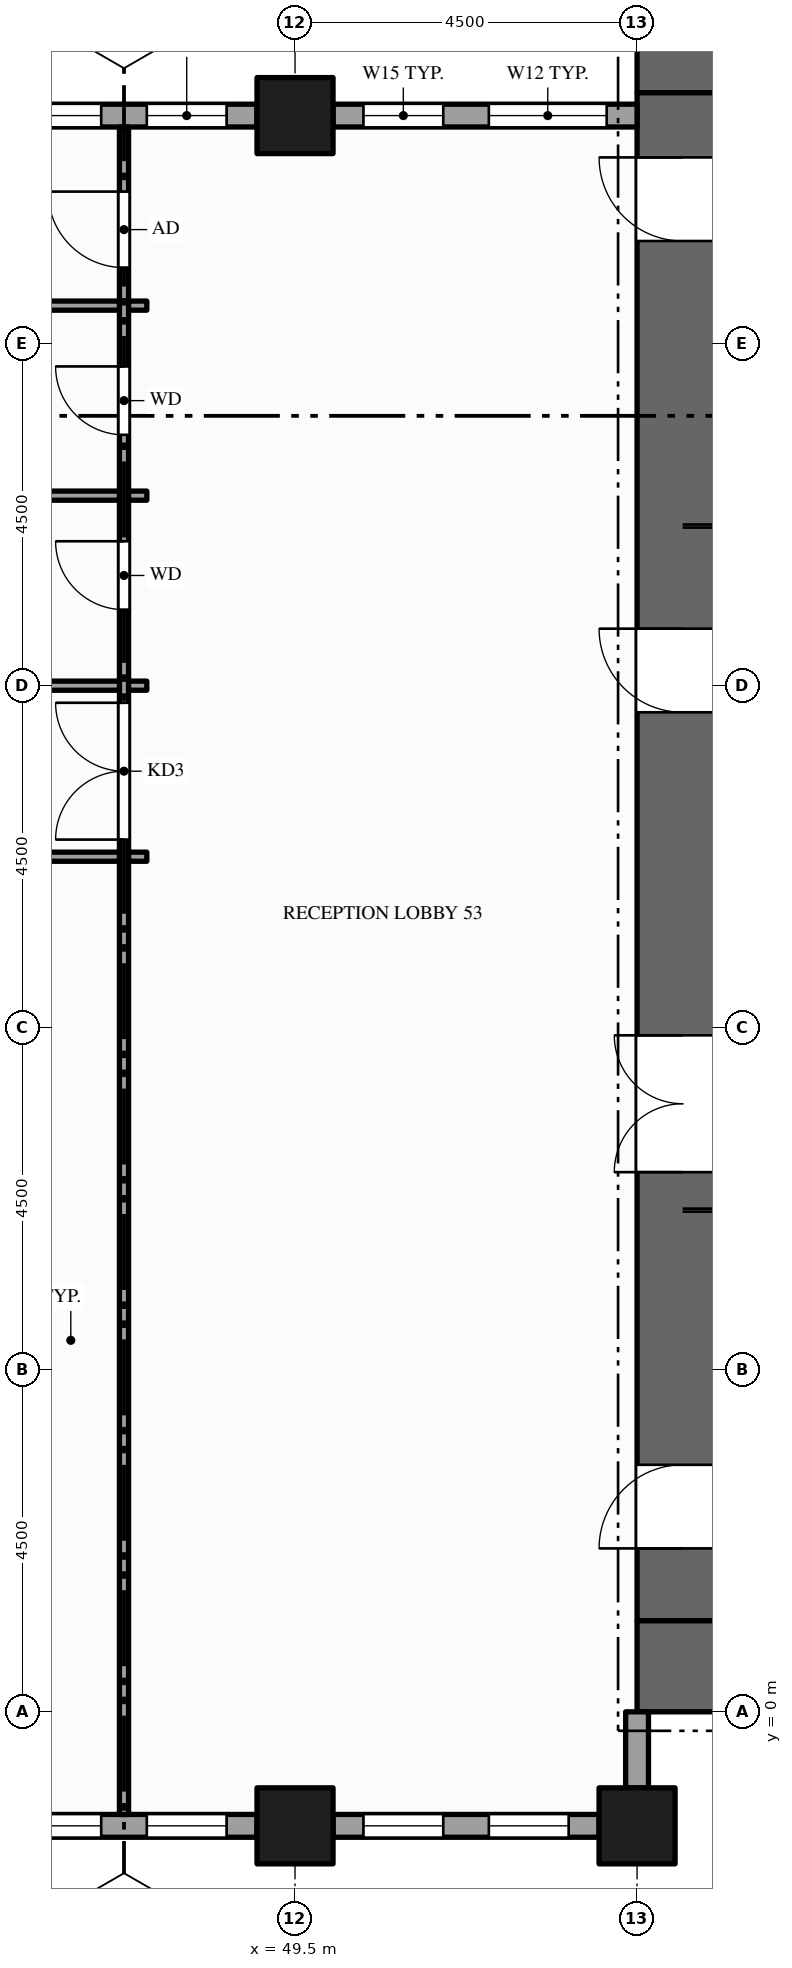
"""IFC4 building model, lengths in metres.
Left out: names, types, materials, properties, quantities, classifications, styles, units other than length and angle.
Written with IfcOpenShell. Run it as: python <this file> out.ifc"""

import sys

from ifc_helpers import new_model, si_unit, direction, frame, frame_2d, origin, origin_2d, place, context, subcontext, project, spatial, rectangle, hollow_rectangle, extrude, element, fill, save


model = new_model("IFC4")
c1 = context("Model", 3, precision=1e-05, world=origin(), true_north=direction((0.0, 1.0)))
c2 = subcontext(c1, "Body", "Model", "MODEL_VIEW")
j1 = project(units=[si_unit("LENGTHUNIT", "METRE"), si_unit("PLANEANGLEUNIT", "RADIAN")], contexts=[c1])
p1 = place(None, origin())
s1 = spatial("IfcSite", under=j1, at=p1, CompositionType="ELEMENT")
p2 = place(p1, origin())
s2 = spatial("IfcBuilding", under=s1, at=p2, CompositionType="ELEMENT")
p3 = place(p2, frame((0.0, 0.0, 127.0)))
s3 = spatial("IfcBuildingStorey", under=s2, at=p3, CompositionType="ELEMENT", Elevation=127.0)
for number, where, z_axis, x_axis in (
    (1, (67.5, 0.6, -0.15), (0.0, 0.0, 1.0), (-1.0, 0.0, 0.0)),
    (2, (54.0, 21.9, -0.15), (0.0, 0.0, 1.0), (1.0, 0.0, 0.0)),
):
    element("IfcWall", number, at=place(p3, frame(where, z_axis=z_axis, x_axis=x_axis)), inside=s3, PredefinedType="SHEAR", context=c2, shape_type="SweptSolid", body=[
        extrude(rectangle(XDim=13.5, YDim=1.2, at=frame_2d((6.75, 0.0))), origin(), (0.0, 0.0, 1.0), 4.0),
    ])
p4 = place(p3, frame((54.6, 1.2, -0.15), z_axis=(0.0, 0.0, 1.0), x_axis=(0.0, 1.0, 0.0)))
e3 = element("IfcWall", 3, at=p4, inside=s3, PredefinedType="SHEAR", context=c2, shape_type="SweptSolid", body=[
    extrude(rectangle(XDim=20.1, YDim=1.2, at=frame_2d((10.05, 0.0))), origin(), (0.0, 0.0, 1.0), 4.0),
])
p5 = place(p4, frame((5.9, 0.0, 0.15)))
e4 = element("IfcOpeningElement", 4, at=p5, cuts=e3, PredefinedType="OPENING", context=c2, shape_type="SweptSolid", body=[
    extrude(rectangle(XDim=1.8, YDim=2.1, at=frame_2d((0.9, 1.05))), frame((0.0, 0.61, 0.0), z_axis=(0.0, -1.0, 0.0), x_axis=(1.0, 0.0, 0.0)), (0.0, 0.0, 1.0), 1.22),
])
p6 = place(p4, frame((11.95, 0.0, 0.15)))
e5 = element("IfcOpeningElement", 5, at=p6, cuts=e3, PredefinedType="OPENING", context=c2, shape_type="SweptSolid", body=[
    extrude(rectangle(XDim=1.1, YDim=2.1, at=frame_2d((0.55, 1.05))), frame((0.0, 0.61, 0.0), z_axis=(0.0, -1.0, 0.0), x_axis=(1.0, 0.0, 0.0)), (0.0, 0.0, 1.0), 1.22),
])
p7 = place(p4, frame((0.95, 0.0, 0.15)))
e6 = element("IfcOpeningElement", 6, at=p7, cuts=e3, PredefinedType="OPENING", context=c2, shape_type="SweptSolid", body=[
    extrude(rectangle(XDim=1.1, YDim=2.1, at=frame_2d((0.55, 1.05))), frame((0.0, 0.61, 0.0), z_axis=(0.0, -1.0, 0.0), x_axis=(1.0, 0.0, 0.0)), (0.0, 0.0, 1.0), 1.22),
])
p8 = place(p4, frame((18.15, 0.0, 0.15)))
e7 = element("IfcOpeningElement", 7, at=p8, cuts=e3, PredefinedType="OPENING", context=c2, shape_type="SweptSolid", body=[
    extrude(rectangle(XDim=1.1, YDim=2.1, at=frame_2d((0.55, 1.05))), frame((0.0, 0.61, 0.0), z_axis=(0.0, -1.0, 0.0), x_axis=(1.0, 0.0, 0.0)), (0.0, 0.0, 1.0), 1.22),
])
for number, where, z_axis, x_axis in (
    (8, (49.5, -1.5, -0.15), (0.0, 0.0, 1.0), (1.0, 0.0, 0.0)),
    (9, (49.5, 21.0, -0.15), (0.0, 0.0, 1.0), (1.0, 0.0, 0.0)),
    (10, (54.0, -1.5, -0.15), (0.0, 0.0, 1.0), (1.0, 0.0, 0.0)),
):
    element("IfcColumn", number, at=place(p3, frame(where, z_axis=z_axis, x_axis=x_axis)), inside=s3, PredefinedType="COLUMN", context=c2, shape_type="SweptSolid", body=[
        extrude(hollow_rectangle(XDim=1.0, YDim=1.0, WallThickness=0.05, at=origin_2d()), origin(), (0.0, 0.0, 1.0), 3.9),
    ])
p9 = place(p3, frame((45.5, -1.5, 0.0), z_axis=(0.0, 0.0, 1.0), x_axis=(1.0, 0.0, 0.0)))
e11 = element("IfcWall", 11, at=p9, inside=s3, PredefinedType="STANDARD", context=c2, shape_type="SweptSolid", body=[
    extrude(rectangle(XDim=3.5, YDim=0.3, at=frame_2d((1.75, 0.0))), origin(), (0.0, 0.0, 1.0), 3.054),
])
p10 = place(p9, frame((0.4, 0.0, 0.9)))
e12 = element("IfcOpeningElement", 12, at=p10, cuts=e11, PredefinedType="OPENING", context=c2, shape_type="SweptSolid", body=[
    extrude(rectangle(XDim=1.05, YDim=2.0, at=frame_2d((0.525, 1.0))), frame((0.0, 0.16, 0.0), z_axis=(0.0, -1.0, 0.0), x_axis=(1.0, 0.0, 0.0)), (0.0, 0.0, 1.0), 0.32),
])
p11 = place(p9, frame((2.05, 0.0, 0.9)))
e13 = element("IfcOpeningElement", 13, at=p11, cuts=e11, PredefinedType="OPENING", context=c2, shape_type="SweptSolid", body=[
    extrude(rectangle(XDim=1.05, YDim=2.0, at=frame_2d((0.525, 1.0))), frame((0.0, 0.16, 0.0), z_axis=(0.0, -1.0, 0.0), x_axis=(1.0, 0.0, 0.0)), (0.0, 0.0, 1.0), 0.32),
])
p12 = place(p3, frame((50.0, -1.5, 0.0), z_axis=(0.0, 0.0, 1.0), x_axis=(1.0, 0.0, 0.0)))
e14 = element("IfcWall", 14, at=p12, inside=s3, PredefinedType="STANDARD", context=c2, shape_type="SweptSolid", body=[
    extrude(rectangle(XDim=3.5, YDim=0.3, at=frame_2d((1.75, 0.0))), origin(), (0.0, 0.0, 1.0), 3.054),
])
p13 = place(p12, frame((0.4, 0.0, 0.9)))
e15 = element("IfcOpeningElement", 15, at=p13, cuts=e14, PredefinedType="OPENING", context=c2, shape_type="SweptSolid", body=[
    extrude(rectangle(XDim=1.05, YDim=2.0, at=frame_2d((0.525, 1.0))), frame((0.0, 0.16, 0.0), z_axis=(0.0, -1.0, 0.0), x_axis=(1.0, 0.0, 0.0)), (0.0, 0.0, 1.0), 0.32),
])
p14 = place(p12, frame((2.05, 0.0, 0.9)))
e16 = element("IfcOpeningElement", 16, at=p14, cuts=e14, PredefinedType="OPENING", context=c2, shape_type="SweptSolid", body=[
    extrude(rectangle(XDim=1.05, YDim=2.0, at=frame_2d((0.525, 1.0))), frame((0.0, 0.16, 0.0), z_axis=(0.0, -1.0, 0.0), x_axis=(1.0, 0.0, 0.0)), (0.0, 0.0, 1.0), 0.32),
])
p15 = place(p3, frame((54.0, -1.0, 0.0), z_axis=(0.0, 0.0, 1.0), x_axis=(0.0, 1.0, 0.0)))
e17 = element("IfcWall", 17, at=p15, inside=s3, PredefinedType="STANDARD", context=c2, shape_type="SweptSolid", body=[
    extrude(rectangle(XDim=1.0, YDim=0.3, at=frame_2d((0.5, 0.0))), origin(), (0.0, 0.0, 1.0), 3.054),
])
p16 = place(p3, frame((54.0, 21.0, 0.0), z_axis=(0.0, 0.0, 1.0), x_axis=(-1.0, 0.0, 0.0)))
e18 = element("IfcWall", 18, at=p16, inside=s3, PredefinedType="STANDARD", context=c2, shape_type="SweptSolid", body=[
    extrude(rectangle(XDim=4.0, YDim=0.3, at=frame_2d((2.0, 0.0))), origin(), (0.0, 0.0, 1.0), 2.838),
])
p17 = place(p16, frame((0.4, 0.0, 0.9)))
e19 = element("IfcOpeningElement", 19, at=p17, cuts=e18, PredefinedType="OPENING", context=c2, shape_type="SweptSolid", body=[
    extrude(rectangle(XDim=1.55, YDim=1.75, at=frame_2d((0.775, 0.875))), frame((0.0, 0.16, 0.0), z_axis=(0.0, -1.0, 0.0), x_axis=(1.0, 0.0, 0.0)), (0.0, 0.0, 1.0), 0.32),
])
p18 = place(p16, frame((2.55, 0.0, 0.9)))
e20 = element("IfcOpeningElement", 20, at=p18, cuts=e18, PredefinedType="OPENING", context=c2, shape_type="SweptSolid", body=[
    extrude(rectangle(XDim=1.05, YDim=1.75, at=frame_2d((0.525, 0.875))), frame((0.0, 0.16, 0.0), z_axis=(0.0, -1.0, 0.0), x_axis=(1.0, 0.0, 0.0)), (0.0, 0.0, 1.0), 0.32),
])
p19 = place(p3, frame((49.0, 21.0, 0.0), z_axis=(0.0, 0.0, 1.0), x_axis=(-1.0, 0.0, 0.0)))
e21 = element("IfcWall", 21, at=p19, inside=s3, PredefinedType="STANDARD", context=c2, shape_type="SweptSolid", body=[
    extrude(rectangle(XDim=3.5, YDim=0.3, at=frame_2d((1.75, 0.0))), origin(), (0.0, 0.0, 1.0), 2.838),
])
p20 = place(p19, frame((0.4, 0.0, 0.9)))
e22 = element("IfcOpeningElement", 22, at=p20, cuts=e21, PredefinedType="OPENING", context=c2, shape_type="SweptSolid", body=[
    extrude(rectangle(XDim=1.05, YDim=1.75, at=frame_2d((0.525, 0.875))), frame((0.0, 0.16, 0.0), z_axis=(0.0, -1.0, 0.0), x_axis=(1.0, 0.0, 0.0)), (0.0, 0.0, 1.0), 0.32),
])
p21 = place(p19, frame((2.05, 0.0, 0.9)))
e23 = element("IfcOpeningElement", 23, at=p21, cuts=e21, PredefinedType="OPENING", context=c2, shape_type="SweptSolid", body=[
    extrude(rectangle(XDim=1.05, YDim=1.75, at=frame_2d((0.525, 0.875))), frame((0.0, 0.16, 0.0), z_axis=(0.0, -1.0, 0.0), x_axis=(1.0, 0.0, 0.0)), (0.0, 0.0, 1.0), 0.32),
])
p22 = place(p3, frame((47.25, -1.35, 0.0), z_axis=(0.0, 0.0, 1.0), x_axis=(0.0, 1.0, 0.0)))
e24 = element("IfcWall", 24, at=p22, inside=s3, PredefinedType="PARTITIONING", context=c2, shape_type="SweptSolid", body=[
    extrude(rectangle(XDim=22.2, YDim=0.12, at=frame_2d((11.1, 0.0))), origin(), (0.0, 0.0, 1.0), 2.838),
])
p23 = place(p22, frame((12.825, 0.0, 0.0)))
e25 = element("IfcOpeningElement", 25, at=p23, cuts=e24, PredefinedType="OPENING", context=c2, shape_type="SweptSolid", body=[
    extrude(rectangle(XDim=1.8, YDim=2.1, at=frame_2d((0.9, 1.05))), frame((0.0, 0.07, 0.0), z_axis=(0.0, -1.0, 0.0), x_axis=(1.0, 0.0, 0.0)), (0.0, 0.0, 1.0), 0.14),
])
p24 = place(p22, frame((15.85, 0.0, 0.0)))
e26 = element("IfcOpeningElement", 26, at=p24, cuts=e24, PredefinedType="OPENING", context=c2, shape_type="SweptSolid", body=[
    extrude(rectangle(XDim=0.9, YDim=2.1, at=frame_2d((0.45, 1.05))), frame((0.0, 0.07, 0.0), z_axis=(0.0, -1.0, 0.0), x_axis=(1.0, 0.0, 0.0)), (0.0, 0.0, 1.0), 0.14),
])
p25 = place(p22, frame((18.15, 0.0, 0.0)))
e27 = element("IfcOpeningElement", 27, at=p25, cuts=e24, PredefinedType="OPENING", context=c2, shape_type="SweptSolid", body=[
    extrude(rectangle(XDim=0.9, YDim=2.1, at=frame_2d((0.45, 1.05))), frame((0.0, 0.07, 0.0), z_axis=(0.0, -1.0, 0.0), x_axis=(1.0, 0.0, 0.0)), (0.0, 0.0, 1.0), 0.14),
])
p26 = place(p22, frame((20.35, 0.0, 0.0)))
e28 = element("IfcOpeningElement", 28, at=p26, cuts=e24, PredefinedType="OPENING", context=c2, shape_type="SweptSolid", body=[
    extrude(rectangle(XDim=1.0, YDim=2.1, at=frame_2d((0.5, 1.05))), frame((0.0, 0.07, 0.0), z_axis=(0.0, -1.0, 0.0), x_axis=(1.0, 0.0, 0.0)), (0.0, 0.0, 1.0), 0.14),
])
p27 = place(p3, frame((42.81, 11.25, 0.0), z_axis=(0.0, 0.0, 1.0), x_axis=(1.0, 0.0, 0.0)))
e29 = element("IfcWall", 29, at=p27, inside=s3, PredefinedType="PARTITIONING", context=c2, shape_type="SweptSolid", body=[
    extrude(rectangle(XDim=4.38, YDim=0.12, at=frame_2d((2.19, 0.0))), origin(), (0.0, 0.0, 1.0), 2.838),
])
p28 = place(p27, frame((1.69, 0.0, 0.0)))
e30 = element("IfcOpeningElement", 30, at=p28, cuts=e29, PredefinedType="OPENING", context=c2, shape_type="SweptSolid", body=[
    extrude(rectangle(XDim=1.0, YDim=2.1, at=frame_2d((0.5, 1.05))), frame((0.0, 0.07, 0.0), z_axis=(0.0, -1.0, 0.0), x_axis=(1.0, 0.0, 0.0)), (0.0, 0.0, 1.0), 0.14),
])
p29 = place(p3, frame((47.31, 11.25, 0.0), z_axis=(0.0, 0.0, 1.0), x_axis=(1.0, 0.0, 0.0)))
e31 = element("IfcWall", 31, at=p29, inside=s3, PredefinedType="PARTITIONING", context=c2, shape_type="SweptSolid", body=[
    extrude(rectangle(XDim=0.24, YDim=0.12, at=frame_2d((0.12, 0.0))), origin(), (0.0, 0.0, 1.0), 2.838),
])
p30 = place(p3, frame((42.81, 13.5, 0.0), z_axis=(0.0, 0.0, 1.0), x_axis=(1.0, 0.0, 0.0)))
e32 = element("IfcWall", 32, at=p30, inside=s3, PredefinedType="PARTITIONING", context=c2, shape_type="SweptSolid", body=[
    extrude(rectangle(XDim=4.38, YDim=0.12, at=frame_2d((2.19, 0.0))), origin(), (0.0, 0.0, 1.0), 2.838),
])
p31 = place(p3, frame((47.31, 13.5, 0.0), z_axis=(0.0, 0.0, 1.0), x_axis=(1.0, 0.0, 0.0)))
e33 = element("IfcWall", 33, at=p31, inside=s3, PredefinedType="PARTITIONING", context=c2, shape_type="SweptSolid", body=[
    extrude(rectangle(XDim=0.24, YDim=0.12, at=frame_2d((0.12, 0.0))), origin(), (0.0, 0.0, 1.0), 2.838),
])
p32 = place(p3, frame((42.81, 16.0, 0.0), z_axis=(0.0, 0.0, 1.0), x_axis=(1.0, 0.0, 0.0)))
e34 = element("IfcWall", 34, at=p32, inside=s3, PredefinedType="PARTITIONING", context=c2, shape_type="SweptSolid", body=[
    extrude(rectangle(XDim=4.38, YDim=0.12, at=frame_2d((2.19, 0.0))), origin(), (0.0, 0.0, 1.0), 2.838),
])
p33 = place(p3, frame((47.31, 16.0, 0.0), z_axis=(0.0, 0.0, 1.0), x_axis=(1.0, 0.0, 0.0)))
e35 = element("IfcWall", 35, at=p33, inside=s3, PredefinedType="PARTITIONING", context=c2, shape_type="SweptSolid", body=[
    extrude(rectangle(XDim=0.24, YDim=0.12, at=frame_2d((0.12, 0.0))), origin(), (0.0, 0.0, 1.0), 2.838),
])
p34 = place(p3, frame((42.81, 18.5, 0.0), z_axis=(0.0, 0.0, 1.0), x_axis=(1.0, 0.0, 0.0)))
e36 = element("IfcWall", 36, at=p34, inside=s3, PredefinedType="PARTITIONING", context=c2, shape_type="SweptSolid", body=[
    extrude(rectangle(XDim=4.38, YDim=0.12, at=frame_2d((2.19, 0.0))), origin(), (0.0, 0.0, 1.0), 2.838),
])
p35 = place(p3, frame((47.31, 18.5, 0.0), z_axis=(0.0, 0.0, 1.0), x_axis=(1.0, 0.0, 0.0)))
e37 = element("IfcWall", 37, at=p35, inside=s3, PredefinedType="PARTITIONING", context=c2, shape_type="SweptSolid", body=[
    extrude(rectangle(XDim=0.24, YDim=0.12, at=frame_2d((0.12, 0.0))), origin(), (0.0, 0.0, 1.0), 2.838),
])
p36 = place(p10, origin())
e38 = element("IfcWindow", 38, at=p36, inside=s3, PartitioningType="SINGLE_PANEL", PredefinedType="WINDOW", context=c2, shape_type="SweptSolid", body=[
    extrude(rectangle(XDim=1.05, YDim=2.0, at=frame_2d((0.525, 1.0))), frame((0.0, 0.03, 0.0), z_axis=(0.0, -1.0, 0.0), x_axis=(1.0, 0.0, 0.0)), (0.0, 0.0, 1.0), 0.06),
])
fill(e12, e38)
p37 = place(p11, origin())
e39 = element("IfcWindow", 39, at=p37, inside=s3, PartitioningType="SINGLE_PANEL", PredefinedType="WINDOW", context=c2, shape_type="SweptSolid", body=[
    extrude(rectangle(XDim=1.05, YDim=2.0, at=frame_2d((0.525, 1.0))), frame((0.0, 0.03, 0.0), z_axis=(0.0, -1.0, 0.0), x_axis=(1.0, 0.0, 0.0)), (0.0, 0.0, 1.0), 0.06),
])
fill(e13, e39)
p38 = place(p13, origin())
e40 = element("IfcWindow", 40, at=p38, inside=s3, PartitioningType="SINGLE_PANEL", PredefinedType="WINDOW", context=c2, shape_type="SweptSolid", body=[
    extrude(rectangle(XDim=1.05, YDim=2.0, at=frame_2d((0.525, 1.0))), frame((0.0, 0.03, 0.0), z_axis=(0.0, -1.0, 0.0), x_axis=(1.0, 0.0, 0.0)), (0.0, 0.0, 1.0), 0.06),
])
fill(e15, e40)
p39 = place(p14, origin())
e41 = element("IfcWindow", 41, at=p39, inside=s3, PartitioningType="SINGLE_PANEL", PredefinedType="WINDOW", context=c2, shape_type="SweptSolid", body=[
    extrude(rectangle(XDim=1.05, YDim=2.0, at=frame_2d((0.525, 1.0))), frame((0.0, 0.03, 0.0), z_axis=(0.0, -1.0, 0.0), x_axis=(1.0, 0.0, 0.0)), (0.0, 0.0, 1.0), 0.06),
])
fill(e16, e41)
p40 = place(p17, origin())
e42 = element("IfcWindow", 42, at=p40, inside=s3, PartitioningType="SINGLE_PANEL", PredefinedType="WINDOW", context=c2, shape_type="SweptSolid", body=[
    extrude(rectangle(XDim=1.55, YDim=1.75, at=frame_2d((0.775, 0.875))), frame((0.0, 0.03, 0.0), z_axis=(0.0, -1.0, 0.0), x_axis=(1.0, 0.0, 0.0)), (0.0, 0.0, 1.0), 0.06),
])
fill(e19, e42)
p41 = place(p18, origin())
e43 = element("IfcWindow", 43, at=p41, inside=s3, PartitioningType="SINGLE_PANEL", PredefinedType="WINDOW", context=c2, shape_type="SweptSolid", body=[
    extrude(rectangle(XDim=1.05, YDim=1.75, at=frame_2d((0.525, 0.875))), frame((0.0, 0.03, 0.0), z_axis=(0.0, -1.0, 0.0), x_axis=(1.0, 0.0, 0.0)), (0.0, 0.0, 1.0), 0.06),
])
fill(e20, e43)
p42 = place(p20, origin())
e44 = element("IfcWindow", 44, at=p42, inside=s3, PartitioningType="SINGLE_PANEL", PredefinedType="WINDOW", context=c2, shape_type="SweptSolid", body=[
    extrude(rectangle(XDim=1.05, YDim=1.75, at=frame_2d((0.525, 0.875))), frame((0.0, 0.03, 0.0), z_axis=(0.0, -1.0, 0.0), x_axis=(1.0, 0.0, 0.0)), (0.0, 0.0, 1.0), 0.06),
])
fill(e22, e44)
p43 = place(p21, origin())
e45 = element("IfcWindow", 45, at=p43, inside=s3, PartitioningType="SINGLE_PANEL", PredefinedType="WINDOW", context=c2, shape_type="SweptSolid", body=[
    extrude(rectangle(XDim=1.05, YDim=1.75, at=frame_2d((0.525, 0.875))), frame((0.0, 0.03, 0.0), z_axis=(0.0, -1.0, 0.0), x_axis=(1.0, 0.0, 0.0)), (0.0, 0.0, 1.0), 0.06),
])
fill(e23, e45)
p44 = place(p5, origin())
e46 = element("IfcDoor", 46, at=p44, inside=s3, OperationType="DOUBLE_DOOR_SINGLE_SWING", PredefinedType="DOOR", context=c2, shape_type="SweptSolid", body=[
    extrude(rectangle(XDim=1.8, YDim=2.1, at=frame_2d((0.9, 1.05))), frame((0.0, 0.025, 0.0), z_axis=(0.0, -1.0, 0.0), x_axis=(1.0, 0.0, 0.0)), (0.0, 0.0, 1.0), 0.05),
])
fill(e4, e46)
p45 = place(p6, origin())
e47 = element("IfcDoor", 47, at=p45, inside=s3, OperationType="SINGLE_SWING_RIGHT", PredefinedType="DOOR", context=c2, shape_type="SweptSolid", body=[
    extrude(rectangle(XDim=1.1, YDim=2.1, at=frame_2d((0.55, 1.05))), frame((0.0, 0.025, 0.0), z_axis=(0.0, -1.0, 0.0), x_axis=(1.0, 0.0, 0.0)), (0.0, 0.0, 1.0), 0.05),
])
fill(e5, e47)
p46 = place(p7, origin())
e48 = element("IfcDoor", 48, at=p46, inside=s3, OperationType="SINGLE_SWING_LEFT", PredefinedType="DOOR", context=c2, shape_type="SweptSolid", body=[
    extrude(rectangle(XDim=1.1, YDim=2.1, at=frame_2d((0.55, 1.05))), frame((0.0, 0.025, 0.0), z_axis=(0.0, -1.0, 0.0), x_axis=(1.0, 0.0, 0.0)), (0.0, 0.0, 1.0), 0.05),
])
fill(e6, e48)
p47 = place(p8, origin())
e49 = element("IfcDoor", 49, at=p47, inside=s3, OperationType="SINGLE_SWING_RIGHT", PredefinedType="DOOR", context=c2, shape_type="SweptSolid", body=[
    extrude(rectangle(XDim=1.1, YDim=2.1, at=frame_2d((0.55, 1.05))), frame((0.0, 0.025, 0.0), z_axis=(0.0, -1.0, 0.0), x_axis=(1.0, 0.0, 0.0)), (0.0, 0.0, 1.0), 0.05),
])
fill(e7, e49)
p48 = place(p23, origin())
e50 = element("IfcDoor", 50, at=p48, inside=s3, OperationType="DOUBLE_DOOR_SINGLE_SWING", PredefinedType="DOOR", context=c2, shape_type="SweptSolid", body=[
    extrude(rectangle(XDim=1.8, YDim=2.1, at=frame_2d((0.9, 1.05))), frame((0.0, 0.025, 0.0), z_axis=(0.0, -1.0, 0.0), x_axis=(1.0, 0.0, 0.0)), (0.0, 0.0, 1.0), 0.05),
])
fill(e25, e50)
p49 = place(p24, origin())
e51 = element("IfcDoor", 51, at=p49, inside=s3, OperationType="SINGLE_SWING_RIGHT", PredefinedType="DOOR", context=c2, shape_type="SweptSolid", body=[
    extrude(rectangle(XDim=0.9, YDim=2.1, at=frame_2d((0.45, 1.05))), frame((0.0, 0.025, 0.0), z_axis=(0.0, -1.0, 0.0), x_axis=(1.0, 0.0, 0.0)), (0.0, 0.0, 1.0), 0.05),
])
fill(e26, e51)
p50 = place(p25, origin())
e52 = element("IfcDoor", 52, at=p50, inside=s3, OperationType="SINGLE_SWING_RIGHT", PredefinedType="DOOR", context=c2, shape_type="SweptSolid", body=[
    extrude(rectangle(XDim=0.9, YDim=2.1, at=frame_2d((0.45, 1.05))), frame((0.0, 0.025, 0.0), z_axis=(0.0, -1.0, 0.0), x_axis=(1.0, 0.0, 0.0)), (0.0, 0.0, 1.0), 0.05),
])
fill(e27, e52)
p51 = place(p26, origin())
e53 = element("IfcDoor", 53, at=p51, inside=s3, OperationType="SINGLE_SWING_RIGHT", PredefinedType="DOOR", context=c2, shape_type="SweptSolid", body=[
    extrude(rectangle(XDim=1.0, YDim=2.1, at=frame_2d((0.5, 1.05))), frame((0.0, 0.025, 0.0), z_axis=(0.0, -1.0, 0.0), x_axis=(1.0, 0.0, 0.0)), (0.0, 0.0, 1.0), 0.05),
])
fill(e28, e53)
save(model, sys.argv[1])
